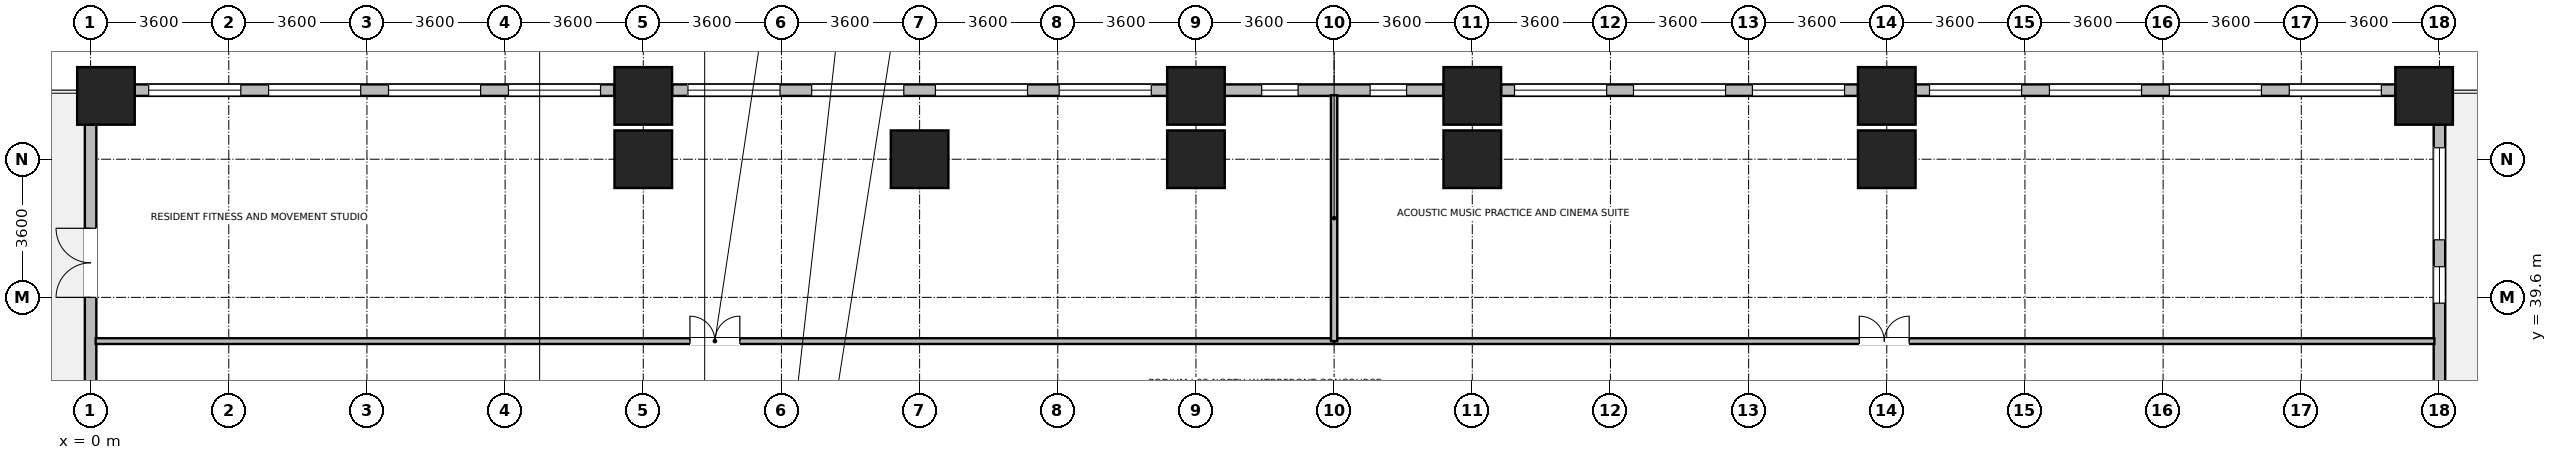
"""IFC4 building model, lengths in metres.
Left out: names, types, materials, properties, quantities, classifications, styles, units other than length and angle.
Written with IfcOpenShell. Run it as: python <this file> out.ifc"""

import sys

from ifc_helpers import new_model, si_unit, direction, frame, frame_2d, origin, origin_2d, place, context, subcontext, project, spatial, rectangle, extrude, source, transform, mapped, element, fill, save


model = new_model("IFC4")
c1 = context("Model", 3, precision=1e-05, world=origin(), true_north=direction((0.0, 1.0)))
c2 = subcontext(c1, "Body", "Model", "MODEL_VIEW")
j1 = project(units=[si_unit("LENGTHUNIT", "METRE"), si_unit("PLANEANGLEUNIT", "RADIAN")], contexts=[c1])
p1 = place(None, origin())
s1 = spatial("IfcSite", under=j1, at=p1, CompositionType="ELEMENT")
p2 = place(p1, origin())
s2 = spatial("IfcBuilding", under=s1, at=p2, CompositionType="ELEMENT")
p3 = place(p2, frame((0.0, 0.0, 15.0)))
s3 = spatial("IfcBuildingStorey", under=s2, at=p3, CompositionType="ELEMENT", Elevation=15.0)
m1 = source(origin(), c2, "Body", "SweptSolid", [
    extrude(rectangle(XDim=1.5, YDim=1.5, at=origin_2d()), origin(), (0.0, 0.0, 1.0), 4.8),
])
for number, where, z_axis, x_axis in (
    (1, (14.4, 43.2, 0.0), (0.0, 0.0, 1.0), (1.0, 0.0, 0.0)),
    (2, (21.6, 43.2, 0.0), (0.0, 0.0, 1.0), (1.0, 0.0, 0.0)),
    (3, (28.8, 43.2, 0.0), (0.0, 0.0, 1.0), (1.0, 0.0, 0.0)),
    (4, (36.0, 43.2, 0.0), (0.0, 0.0, 1.0), (1.0, 0.0, 0.0)),
    (5, (46.8, 43.2, 0.0), (0.0, 0.0, 1.0), (1.0, 0.0, 0.0)),
    (6, (0.4, 44.85, 0.0), (0.0, 0.0, 1.0), (1.0, 0.0, 0.0)),
    (7, (14.4, 44.85, 0.0), (0.0, 0.0, 1.0), (1.0, 0.0, 0.0)),
    (8, (28.8, 44.85, 0.0), (0.0, 0.0, 1.0), (1.0, 0.0, 0.0)),
    (9, (36.0, 44.85, 0.0), (0.0, 0.0, 1.0), (1.0, 0.0, 0.0)),
    (10, (46.8, 44.85, 0.0), (0.0, 0.0, 1.0), (1.0, 0.0, 0.0)),
    (11, (60.8, 44.85, 0.0), (0.0, 0.0, 1.0), (1.0, 0.0, 0.0)),
):
    element("IfcColumn", number, at=place(p3, frame(where, z_axis=z_axis, x_axis=x_axis)), inside=s3, PredefinedType="COLUMN", context=c2, shape_type="MappedRepresentation", body=[
        mapped(m1, transform((0.0, 0.0, 0.0), x_axis=(1.0, 0.0, 0.0), y_axis=(0.0, 1.0, 0.0), z_axis=(0.0, 0.0, 1.0), scale=1.0)),
    ])
p4 = place(p3, frame((61.2, 44.099, 0.0), z_axis=(0.0, 0.0, 1.0), x_axis=(0.0, -1.0, 0.0)))
e12 = element("IfcWall", 12, at=p4, inside=s3, PredefinedType="STANDARD", context=c2, shape_type="SweptSolid", body=[
    extrude(rectangle(XDim=7.198, YDim=0.3, at=frame_2d((3.599, 0.0))), origin(), (0.0, 0.0, 1.0), 4.36),
])
p5 = place(p4, frame((0.6, 0.0, 0.9)))
e13 = element("IfcOpeningElement", 13, at=p5, cuts=e12, PredefinedType="OPENING", context=c2, shape_type="SweptSolid", body=[
    extrude(rectangle(XDim=2.4, YDim=2.5, at=frame_2d((1.2, 1.25))), frame((0.0, 0.16, 0.0), z_axis=(0.0, -1.0, 0.0), x_axis=(1.0, 0.0, 0.0)), (0.0, 0.0, 1.0), 0.32),
])
p6 = place(p4, frame((3.7, 0.0, 0.9)))
e14 = element("IfcOpeningElement", 14, at=p6, cuts=e12, PredefinedType="OPENING", context=c2, shape_type="SweptSolid", body=[
    extrude(rectangle(XDim=0.95, YDim=1.75, at=frame_2d((0.475, 0.875))), frame((0.0, 0.16, 0.0), z_axis=(0.0, -1.0, 0.0), x_axis=(1.0, 0.0, 0.0)), (0.0, 0.0, 1.0), 0.32),
])
p7 = place(p3, frame((47.551, 45.0, 0.0), z_axis=(0.0, 0.0, 1.0), x_axis=(1.0, 0.0, 0.0)))
e15 = element("IfcWall", 15, at=p7, inside=s3, PredefinedType="STANDARD", context=c2, shape_type="SweptSolid", body=[
    extrude(rectangle(XDim=12.498, YDim=0.3, at=frame_2d((6.249, 0.0))), origin(), (0.0, 0.0, 1.0), 3.66),
])
p8 = place(p7, frame((0.362, 0.0, 0.9)))
e16 = element("IfcOpeningElement", 16, at=p8, cuts=e15, PredefinedType="OPENING", context=c2, shape_type="SweptSolid", body=[
    extrude(rectangle(XDim=2.4, YDim=2.5, at=frame_2d((1.2, 1.25))), frame((0.0, 0.16, 0.0), z_axis=(0.0, -1.0, 0.0), x_axis=(1.0, 0.0, 0.0)), (0.0, 0.0, 1.0), 0.32),
])
p9 = place(p7, frame((3.487, 0.0, 0.9)))
e17 = element("IfcOpeningElement", 17, at=p9, cuts=e15, PredefinedType="OPENING", context=c2, shape_type="SweptSolid", body=[
    extrude(rectangle(XDim=2.4, YDim=2.5, at=frame_2d((1.2, 1.25))), frame((0.0, 0.16, 0.0), z_axis=(0.0, -1.0, 0.0), x_axis=(1.0, 0.0, 0.0)), (0.0, 0.0, 1.0), 0.32),
])
p10 = place(p7, frame((6.611, 0.0, 0.9)))
e18 = element("IfcOpeningElement", 18, at=p10, cuts=e15, PredefinedType="OPENING", context=c2, shape_type="SweptSolid", body=[
    extrude(rectangle(XDim=2.4, YDim=2.5, at=frame_2d((1.2, 1.25))), frame((0.0, 0.16, 0.0), z_axis=(0.0, -1.0, 0.0), x_axis=(1.0, 0.0, 0.0)), (0.0, 0.0, 1.0), 0.32),
])
p11 = place(p7, frame((9.736, 0.0, 0.9)))
e19 = element("IfcOpeningElement", 19, at=p11, cuts=e15, PredefinedType="OPENING", context=c2, shape_type="SweptSolid", body=[
    extrude(rectangle(XDim=2.4, YDim=2.5, at=frame_2d((1.2, 1.25))), frame((0.0, 0.16, 0.0), z_axis=(0.0, -1.0, 0.0), x_axis=(1.0, 0.0, 0.0)), (0.0, 0.0, 1.0), 0.32),
])
p12 = place(p3, frame((36.751, 45.0, 0.0), z_axis=(0.0, 0.0, 1.0), x_axis=(1.0, 0.0, 0.0)))
e20 = element("IfcWall", 20, at=p12, inside=s3, PredefinedType="STANDARD", context=c2, shape_type="SweptSolid", body=[
    extrude(rectangle(XDim=9.298, YDim=0.3, at=frame_2d((4.649, 0.0))), origin(), (0.0, 0.0, 1.0), 3.66),
])
p13 = place(p12, frame((0.35, 0.0, 0.9)))
e21 = element("IfcOpeningElement", 21, at=p13, cuts=e20, PredefinedType="OPENING", context=c2, shape_type="SweptSolid", body=[
    extrude(rectangle(XDim=2.4, YDim=2.5, at=frame_2d((1.2, 1.25))), frame((0.0, 0.16, 0.0), z_axis=(0.0, -1.0, 0.0), x_axis=(1.0, 0.0, 0.0)), (0.0, 0.0, 1.0), 0.32),
])
p14 = place(p12, frame((3.449, 0.0, 0.9)))
e22 = element("IfcOpeningElement", 22, at=p14, cuts=e20, PredefinedType="OPENING", context=c2, shape_type="SweptSolid", body=[
    extrude(rectangle(XDim=2.4, YDim=2.5, at=frame_2d((1.2, 1.25))), frame((0.0, 0.16, 0.0), z_axis=(0.0, -1.0, 0.0), x_axis=(1.0, 0.0, 0.0)), (0.0, 0.0, 1.0), 0.32),
])
p15 = place(p12, frame((6.548, 0.0, 0.9)))
e23 = element("IfcOpeningElement", 23, at=p15, cuts=e20, PredefinedType="OPENING", context=c2, shape_type="SweptSolid", body=[
    extrude(rectangle(XDim=2.4, YDim=2.5, at=frame_2d((1.2, 1.25))), frame((0.0, 0.16, 0.0), z_axis=(0.0, -1.0, 0.0), x_axis=(1.0, 0.0, 0.0)), (0.0, 0.0, 1.0), 0.32),
])
p16 = place(p3, frame((29.551, 45.0, 0.0), z_axis=(0.0, 0.0, 1.0), x_axis=(1.0, 0.0, 0.0)))
e24 = element("IfcWall", 24, at=p16, inside=s3, PredefinedType="STANDARD", context=c2, shape_type="SweptSolid", body=[
    extrude(rectangle(XDim=5.698, YDim=0.3, at=frame_2d((2.849, 0.0))), origin(), (0.0, 0.0, 1.0), 3.66),
])
p17 = place(p16, frame((0.961, 0.0, 0.9)))
e25 = element("IfcOpeningElement", 25, at=p17, cuts=e24, PredefinedType="OPENING", context=c2, shape_type="SweptSolid", body=[
    extrude(rectangle(XDim=0.95, YDim=1.75, at=frame_2d((0.475, 0.875))), frame((0.0, 0.16, 0.0), z_axis=(0.0, -1.0, 0.0), x_axis=(1.0, 0.0, 0.0)), (0.0, 0.0, 1.0), 0.32),
])
p18 = place(p16, frame((3.787, 0.0, 0.9)))
e26 = element("IfcOpeningElement", 26, at=p18, cuts=e24, PredefinedType="OPENING", context=c2, shape_type="SweptSolid", body=[
    extrude(rectangle(XDim=0.95, YDim=1.75, at=frame_2d((0.475, 0.875))), frame((0.0, 0.16, 0.0), z_axis=(0.0, -1.0, 0.0), x_axis=(1.0, 0.0, 0.0)), (0.0, 0.0, 1.0), 0.32),
])
p19 = place(p3, frame((15.151, 45.0, 0.0), z_axis=(0.0, 0.0, 1.0), x_axis=(1.0, 0.0, 0.0)))
e27 = element("IfcWall", 27, at=p19, inside=s3, PredefinedType="STANDARD", context=c2, shape_type="SweptSolid", body=[
    extrude(rectangle(XDim=12.898, YDim=0.3, at=frame_2d((6.449, 0.0))), origin(), (0.0, 0.0, 1.0), 3.66),
])
p20 = place(p19, frame((0.412, 0.0, 0.9)))
e28 = element("IfcOpeningElement", 28, at=p20, cuts=e27, PredefinedType="OPENING", context=c2, shape_type="SweptSolid", body=[
    extrude(rectangle(XDim=2.4, YDim=2.5, at=frame_2d((1.2, 1.25))), frame((0.0, 0.16, 0.0), z_axis=(0.0, -1.0, 0.0), x_axis=(1.0, 0.0, 0.0)), (0.0, 0.0, 1.0), 0.32),
])
p21 = place(p19, frame((3.637, 0.0, 0.9)))
e29 = element("IfcOpeningElement", 29, at=p21, cuts=e27, PredefinedType="OPENING", context=c2, shape_type="SweptSolid", body=[
    extrude(rectangle(XDim=2.4, YDim=2.5, at=frame_2d((1.2, 1.25))), frame((0.0, 0.16, 0.0), z_axis=(0.0, -1.0, 0.0), x_axis=(1.0, 0.0, 0.0)), (0.0, 0.0, 1.0), 0.32),
])
p22 = place(p19, frame((6.861, 0.0, 0.9)))
e30 = element("IfcOpeningElement", 30, at=p22, cuts=e27, PredefinedType="OPENING", context=c2, shape_type="SweptSolid", body=[
    extrude(rectangle(XDim=2.4, YDim=2.5, at=frame_2d((1.2, 1.25))), frame((0.0, 0.16, 0.0), z_axis=(0.0, -1.0, 0.0), x_axis=(1.0, 0.0, 0.0)), (0.0, 0.0, 1.0), 0.32),
])
p23 = place(p19, frame((10.086, 0.0, 0.9)))
e31 = element("IfcOpeningElement", 31, at=p23, cuts=e27, PredefinedType="OPENING", context=c2, shape_type="SweptSolid", body=[
    extrude(rectangle(XDim=2.4, YDim=2.5, at=frame_2d((1.2, 1.25))), frame((0.0, 0.16, 0.0), z_axis=(0.0, -1.0, 0.0), x_axis=(1.0, 0.0, 0.0)), (0.0, 0.0, 1.0), 0.32),
])
p24 = place(p3, frame((1.151, 45.0, 0.0), z_axis=(0.0, 0.0, 1.0), x_axis=(1.0, 0.0, 0.0)))
e32 = element("IfcWall", 32, at=p24, inside=s3, PredefinedType="STANDARD", context=c2, shape_type="SweptSolid", body=[
    extrude(rectangle(XDim=12.498, YDim=0.3, at=frame_2d((6.249, 0.0))), origin(), (0.0, 0.0, 1.0), 3.66),
])
p25 = place(p24, frame((0.362, 0.0, 0.9)))
e33 = element("IfcOpeningElement", 33, at=p25, cuts=e32, PredefinedType="OPENING", context=c2, shape_type="SweptSolid", body=[
    extrude(rectangle(XDim=2.4, YDim=2.5, at=frame_2d((1.2, 1.25))), frame((0.0, 0.16, 0.0), z_axis=(0.0, -1.0, 0.0), x_axis=(1.0, 0.0, 0.0)), (0.0, 0.0, 1.0), 0.32),
])
p26 = place(p24, frame((3.487, 0.0, 0.9)))
e34 = element("IfcOpeningElement", 34, at=p26, cuts=e32, PredefinedType="OPENING", context=c2, shape_type="SweptSolid", body=[
    extrude(rectangle(XDim=2.4, YDim=2.5, at=frame_2d((1.2, 1.25))), frame((0.0, 0.16, 0.0), z_axis=(0.0, -1.0, 0.0), x_axis=(1.0, 0.0, 0.0)), (0.0, 0.0, 1.0), 0.32),
])
p27 = place(p24, frame((6.611, 0.0, 0.9)))
e35 = element("IfcOpeningElement", 35, at=p27, cuts=e32, PredefinedType="OPENING", context=c2, shape_type="SweptSolid", body=[
    extrude(rectangle(XDim=2.4, YDim=2.5, at=frame_2d((1.2, 1.25))), frame((0.0, 0.16, 0.0), z_axis=(0.0, -1.0, 0.0), x_axis=(1.0, 0.0, 0.0)), (0.0, 0.0, 1.0), 0.32),
])
p28 = place(p24, frame((9.736, 0.0, 0.9)))
e36 = element("IfcOpeningElement", 36, at=p28, cuts=e32, PredefinedType="OPENING", context=c2, shape_type="SweptSolid", body=[
    extrude(rectangle(XDim=2.4, YDim=2.5, at=frame_2d((1.2, 1.25))), frame((0.0, 0.16, 0.0), z_axis=(0.0, -1.0, 0.0), x_axis=(1.0, 0.0, 0.0)), (0.0, 0.0, 1.0), 0.32),
])
p29 = place(p3, frame((0.0, 36.901, 0.0), z_axis=(0.0, 0.0, 1.0), x_axis=(0.0, 1.0, 0.0)))
e37 = element("IfcWall", 37, at=p29, inside=s3, PredefinedType="STANDARD", context=c2, shape_type="SweptSolid", body=[
    extrude(rectangle(XDim=7.198, YDim=0.3, at=frame_2d((3.599, 0.0))), origin(), (0.0, 0.0, 1.0), 4.36),
])
p30 = place(p29, frame((2.699, 0.0, 0.0)))
e38 = element("IfcOpeningElement", 38, at=p30, cuts=e37, PredefinedType="OPENING", context=c2, shape_type="SweptSolid", body=[
    extrude(rectangle(XDim=1.8, YDim=2.2, at=frame_2d((0.9, 1.1))), frame((0.0, 0.16, 0.0), z_axis=(0.0, -1.0, 0.0), x_axis=(1.0, 0.0, 0.0)), (0.0, 0.0, 1.0), 0.32),
])
p31 = place(p3, frame((0.132, 38.46, 0.0), z_axis=(0.0, 0.0, 1.0), x_axis=(1.0, 0.0, 0.0)))
e39 = element("IfcWall", 39, at=p31, inside=s3, PredefinedType="PARTITIONING", context=c2, shape_type="SweptSolid", body=[
    extrude(rectangle(XDim=32.268, YDim=0.15, at=frame_2d((16.134, 0.0))), origin(), (0.0, 0.0, 1.0), 4.36),
])
p32 = place(p31, frame((15.484, 0.0, 0.0)))
e40 = element("IfcOpeningElement", 40, at=p32, cuts=e39, PredefinedType="OPENING", context=c2, shape_type="SweptSolid", body=[
    extrude(rectangle(XDim=1.3, YDim=2.12, at=frame_2d((0.65, 1.06))), frame((0.0, 0.085, 0.0), z_axis=(0.0, -1.0, 0.0), x_axis=(1.0, 0.0, 0.0)), (0.0, 0.0, 1.0), 0.17),
])
p33 = place(p3, frame((32.4, 38.46, 0.0), z_axis=(0.0, 0.0, 1.0), x_axis=(1.0, 0.0, 0.0)))
e41 = element("IfcWall", 41, at=p33, inside=s3, PredefinedType="PARTITIONING", context=c2, shape_type="SweptSolid", body=[
    extrude(rectangle(XDim=28.668, YDim=0.15, at=frame_2d((14.334, 0.0))), origin(), (0.0, 0.0, 1.0), 4.36),
])
p34 = place(p33, frame((13.684, 0.0, 0.0)))
e42 = element("IfcOpeningElement", 42, at=p34, cuts=e41, PredefinedType="OPENING", context=c2, shape_type="SweptSolid", body=[
    extrude(rectangle(XDim=1.3, YDim=2.12, at=frame_2d((0.65, 1.06))), frame((0.0, 0.085, 0.0), z_axis=(0.0, -1.0, 0.0), x_axis=(1.0, 0.0, 0.0)), (0.0, 0.0, 1.0), 0.17),
])
p35 = place(p3, frame((32.4, 38.46, 0.0), z_axis=(0.0, 0.0, 1.0), x_axis=(0.0, 1.0, 0.0)))
e43 = element("IfcWall", 43, at=p35, inside=s3, PredefinedType="PARTITIONING", context=c2, shape_type="SweptSolid", body=[
    extrude(rectangle(XDim=6.408, YDim=0.165, at=frame_2d((3.204, 0.0))), origin(), (0.0, 0.0, 1.0), 4.36),
])
p36 = place(p5, origin())
e44 = element("IfcWindow", 44, at=p36, inside=s3, PartitioningType="SINGLE_PANEL", PredefinedType="WINDOW", context=c2, shape_type="SweptSolid", body=[
    extrude(rectangle(XDim=2.4, YDim=2.5, at=frame_2d((1.2, 1.25))), frame((0.0, 0.03, 0.0), z_axis=(0.0, -1.0, 0.0), x_axis=(1.0, 0.0, 0.0)), (0.0, 0.0, 1.0), 0.06),
])
fill(e13, e44)
p37 = place(p6, origin())
e45 = element("IfcWindow", 45, at=p37, inside=s3, PartitioningType="SINGLE_PANEL", PredefinedType="WINDOW", context=c2, shape_type="SweptSolid", body=[
    extrude(rectangle(XDim=0.95, YDim=1.75, at=frame_2d((0.475, 0.875))), frame((0.0, 0.03, 0.0), z_axis=(0.0, -1.0, 0.0), x_axis=(1.0, 0.0, 0.0)), (0.0, 0.0, 1.0), 0.06),
])
fill(e14, e45)
p38 = place(p8, origin())
e46 = element("IfcWindow", 46, at=p38, inside=s3, PartitioningType="SINGLE_PANEL", PredefinedType="WINDOW", context=c2, shape_type="SweptSolid", body=[
    extrude(rectangle(XDim=2.4, YDim=2.5, at=frame_2d((1.2, 1.25))), frame((0.0, 0.03, 0.0), z_axis=(0.0, -1.0, 0.0), x_axis=(1.0, 0.0, 0.0)), (0.0, 0.0, 1.0), 0.06),
])
fill(e16, e46)
p39 = place(p9, origin())
e47 = element("IfcWindow", 47, at=p39, inside=s3, PartitioningType="SINGLE_PANEL", PredefinedType="WINDOW", context=c2, shape_type="SweptSolid", body=[
    extrude(rectangle(XDim=2.4, YDim=2.5, at=frame_2d((1.2, 1.25))), frame((0.0, 0.03, 0.0), z_axis=(0.0, -1.0, 0.0), x_axis=(1.0, 0.0, 0.0)), (0.0, 0.0, 1.0), 0.06),
])
fill(e17, e47)
p40 = place(p10, origin())
e48 = element("IfcWindow", 48, at=p40, inside=s3, PartitioningType="SINGLE_PANEL", PredefinedType="WINDOW", context=c2, shape_type="SweptSolid", body=[
    extrude(rectangle(XDim=2.4, YDim=2.5, at=frame_2d((1.2, 1.25))), frame((0.0, 0.03, 0.0), z_axis=(0.0, -1.0, 0.0), x_axis=(1.0, 0.0, 0.0)), (0.0, 0.0, 1.0), 0.06),
])
fill(e18, e48)
p41 = place(p11, origin())
e49 = element("IfcWindow", 49, at=p41, inside=s3, PartitioningType="SINGLE_PANEL", PredefinedType="WINDOW", context=c2, shape_type="SweptSolid", body=[
    extrude(rectangle(XDim=2.4, YDim=2.5, at=frame_2d((1.2, 1.25))), frame((0.0, 0.03, 0.0), z_axis=(0.0, -1.0, 0.0), x_axis=(1.0, 0.0, 0.0)), (0.0, 0.0, 1.0), 0.06),
])
fill(e19, e49)
p42 = place(p13, origin())
e50 = element("IfcWindow", 50, at=p42, inside=s3, PartitioningType="SINGLE_PANEL", PredefinedType="WINDOW", context=c2, shape_type="SweptSolid", body=[
    extrude(rectangle(XDim=2.4, YDim=2.5, at=frame_2d((1.2, 1.25))), frame((0.0, 0.03, 0.0), z_axis=(0.0, -1.0, 0.0), x_axis=(1.0, 0.0, 0.0)), (0.0, 0.0, 1.0), 0.06),
])
fill(e21, e50)
p43 = place(p14, origin())
e51 = element("IfcWindow", 51, at=p43, inside=s3, PartitioningType="SINGLE_PANEL", PredefinedType="WINDOW", context=c2, shape_type="SweptSolid", body=[
    extrude(rectangle(XDim=2.4, YDim=2.5, at=frame_2d((1.2, 1.25))), frame((0.0, 0.03, 0.0), z_axis=(0.0, -1.0, 0.0), x_axis=(1.0, 0.0, 0.0)), (0.0, 0.0, 1.0), 0.06),
])
fill(e22, e51)
p44 = place(p15, origin())
e52 = element("IfcWindow", 52, at=p44, inside=s3, PartitioningType="SINGLE_PANEL", PredefinedType="WINDOW", context=c2, shape_type="SweptSolid", body=[
    extrude(rectangle(XDim=2.4, YDim=2.5, at=frame_2d((1.2, 1.25))), frame((0.0, 0.03, 0.0), z_axis=(0.0, -1.0, 0.0), x_axis=(1.0, 0.0, 0.0)), (0.0, 0.0, 1.0), 0.06),
])
fill(e23, e52)
p45 = place(p17, origin())
e53 = element("IfcWindow", 53, at=p45, inside=s3, PartitioningType="SINGLE_PANEL", PredefinedType="WINDOW", context=c2, shape_type="SweptSolid", body=[
    extrude(rectangle(XDim=0.95, YDim=1.75, at=frame_2d((0.475, 0.875))), frame((0.0, 0.03, 0.0), z_axis=(0.0, -1.0, 0.0), x_axis=(1.0, 0.0, 0.0)), (0.0, 0.0, 1.0), 0.06),
])
fill(e25, e53)
p46 = place(p18, origin())
e54 = element("IfcWindow", 54, at=p46, inside=s3, PartitioningType="SINGLE_PANEL", PredefinedType="WINDOW", context=c2, shape_type="SweptSolid", body=[
    extrude(rectangle(XDim=0.95, YDim=1.75, at=frame_2d((0.475, 0.875))), frame((0.0, 0.03, 0.0), z_axis=(0.0, -1.0, 0.0), x_axis=(1.0, 0.0, 0.0)), (0.0, 0.0, 1.0), 0.06),
])
fill(e26, e54)
p47 = place(p20, origin())
e55 = element("IfcWindow", 55, at=p47, inside=s3, PartitioningType="SINGLE_PANEL", PredefinedType="WINDOW", context=c2, shape_type="SweptSolid", body=[
    extrude(rectangle(XDim=2.4, YDim=2.5, at=frame_2d((1.2, 1.25))), frame((0.0, 0.03, 0.0), z_axis=(0.0, -1.0, 0.0), x_axis=(1.0, 0.0, 0.0)), (0.0, 0.0, 1.0), 0.06),
])
fill(e28, e55)
p48 = place(p21, origin())
e56 = element("IfcWindow", 56, at=p48, inside=s3, PartitioningType="SINGLE_PANEL", PredefinedType="WINDOW", context=c2, shape_type="SweptSolid", body=[
    extrude(rectangle(XDim=2.4, YDim=2.5, at=frame_2d((1.2, 1.25))), frame((0.0, 0.03, 0.0), z_axis=(0.0, -1.0, 0.0), x_axis=(1.0, 0.0, 0.0)), (0.0, 0.0, 1.0), 0.06),
])
fill(e29, e56)
p49 = place(p22, origin())
e57 = element("IfcWindow", 57, at=p49, inside=s3, PartitioningType="SINGLE_PANEL", PredefinedType="WINDOW", context=c2, shape_type="SweptSolid", body=[
    extrude(rectangle(XDim=2.4, YDim=2.5, at=frame_2d((1.2, 1.25))), frame((0.0, 0.03, 0.0), z_axis=(0.0, -1.0, 0.0), x_axis=(1.0, 0.0, 0.0)), (0.0, 0.0, 1.0), 0.06),
])
fill(e30, e57)
p50 = place(p23, origin())
e58 = element("IfcWindow", 58, at=p50, inside=s3, PartitioningType="SINGLE_PANEL", PredefinedType="WINDOW", context=c2, shape_type="SweptSolid", body=[
    extrude(rectangle(XDim=2.4, YDim=2.5, at=frame_2d((1.2, 1.25))), frame((0.0, 0.03, 0.0), z_axis=(0.0, -1.0, 0.0), x_axis=(1.0, 0.0, 0.0)), (0.0, 0.0, 1.0), 0.06),
])
fill(e31, e58)
p51 = place(p25, origin())
e59 = element("IfcWindow", 59, at=p51, inside=s3, PartitioningType="SINGLE_PANEL", PredefinedType="WINDOW", context=c2, shape_type="SweptSolid", body=[
    extrude(rectangle(XDim=2.4, YDim=2.5, at=frame_2d((1.2, 1.25))), frame((0.0, 0.03, 0.0), z_axis=(0.0, -1.0, 0.0), x_axis=(1.0, 0.0, 0.0)), (0.0, 0.0, 1.0), 0.06),
])
fill(e33, e59)
p52 = place(p26, origin())
e60 = element("IfcWindow", 60, at=p52, inside=s3, PartitioningType="SINGLE_PANEL", PredefinedType="WINDOW", context=c2, shape_type="SweptSolid", body=[
    extrude(rectangle(XDim=2.4, YDim=2.5, at=frame_2d((1.2, 1.25))), frame((0.0, 0.03, 0.0), z_axis=(0.0, -1.0, 0.0), x_axis=(1.0, 0.0, 0.0)), (0.0, 0.0, 1.0), 0.06),
])
fill(e34, e60)
p53 = place(p27, origin())
e61 = element("IfcWindow", 61, at=p53, inside=s3, PartitioningType="SINGLE_PANEL", PredefinedType="WINDOW", context=c2, shape_type="SweptSolid", body=[
    extrude(rectangle(XDim=2.4, YDim=2.5, at=frame_2d((1.2, 1.25))), frame((0.0, 0.03, 0.0), z_axis=(0.0, -1.0, 0.0), x_axis=(1.0, 0.0, 0.0)), (0.0, 0.0, 1.0), 0.06),
])
fill(e35, e61)
p54 = place(p28, origin())
e62 = element("IfcWindow", 62, at=p54, inside=s3, PartitioningType="SINGLE_PANEL", PredefinedType="WINDOW", context=c2, shape_type="SweptSolid", body=[
    extrude(rectangle(XDim=2.4, YDim=2.5, at=frame_2d((1.2, 1.25))), frame((0.0, 0.03, 0.0), z_axis=(0.0, -1.0, 0.0), x_axis=(1.0, 0.0, 0.0)), (0.0, 0.0, 1.0), 0.06),
])
fill(e36, e62)
p55 = place(p30, origin())
e63 = element("IfcDoor", 63, at=p55, inside=s3, OperationType="DOUBLE_DOOR_SINGLE_SWING", PredefinedType="DOOR", context=c2, shape_type="SweptSolid", body=[
    extrude(rectangle(XDim=1.8, YDim=2.2, at=frame_2d((0.9, 1.1))), frame((0.0, 0.025, 0.0), z_axis=(0.0, -1.0, 0.0), x_axis=(1.0, 0.0, 0.0)), (0.0, 0.0, 1.0), 0.05),
])
fill(e38, e63)
p56 = place(p32, origin())
e64 = element("IfcDoor", 64, at=p56, inside=s3, OperationType="DOUBLE_DOOR_SINGLE_SWING", PredefinedType="DOOR", context=c2, shape_type="SweptSolid", body=[
    extrude(rectangle(XDim=1.3, YDim=2.12, at=frame_2d((0.65, 1.06))), frame((0.0, 0.025, 0.0), z_axis=(0.0, -1.0, 0.0), x_axis=(1.0, 0.0, 0.0)), (0.0, 0.0, 1.0), 0.05),
])
fill(e40, e64)
p57 = place(p34, origin())
e65 = element("IfcDoor", 65, at=p57, inside=s3, OperationType="DOUBLE_DOOR_SINGLE_SWING", PredefinedType="DOOR", context=c2, shape_type="SweptSolid", body=[
    extrude(rectangle(XDim=1.3, YDim=2.12, at=frame_2d((0.65, 1.06))), frame((0.0, 0.025, 0.0), z_axis=(0.0, -1.0, 0.0), x_axis=(1.0, 0.0, 0.0)), (0.0, 0.0, 1.0), 0.05),
])
fill(e42, e65)
save(model, sys.argv[1])
